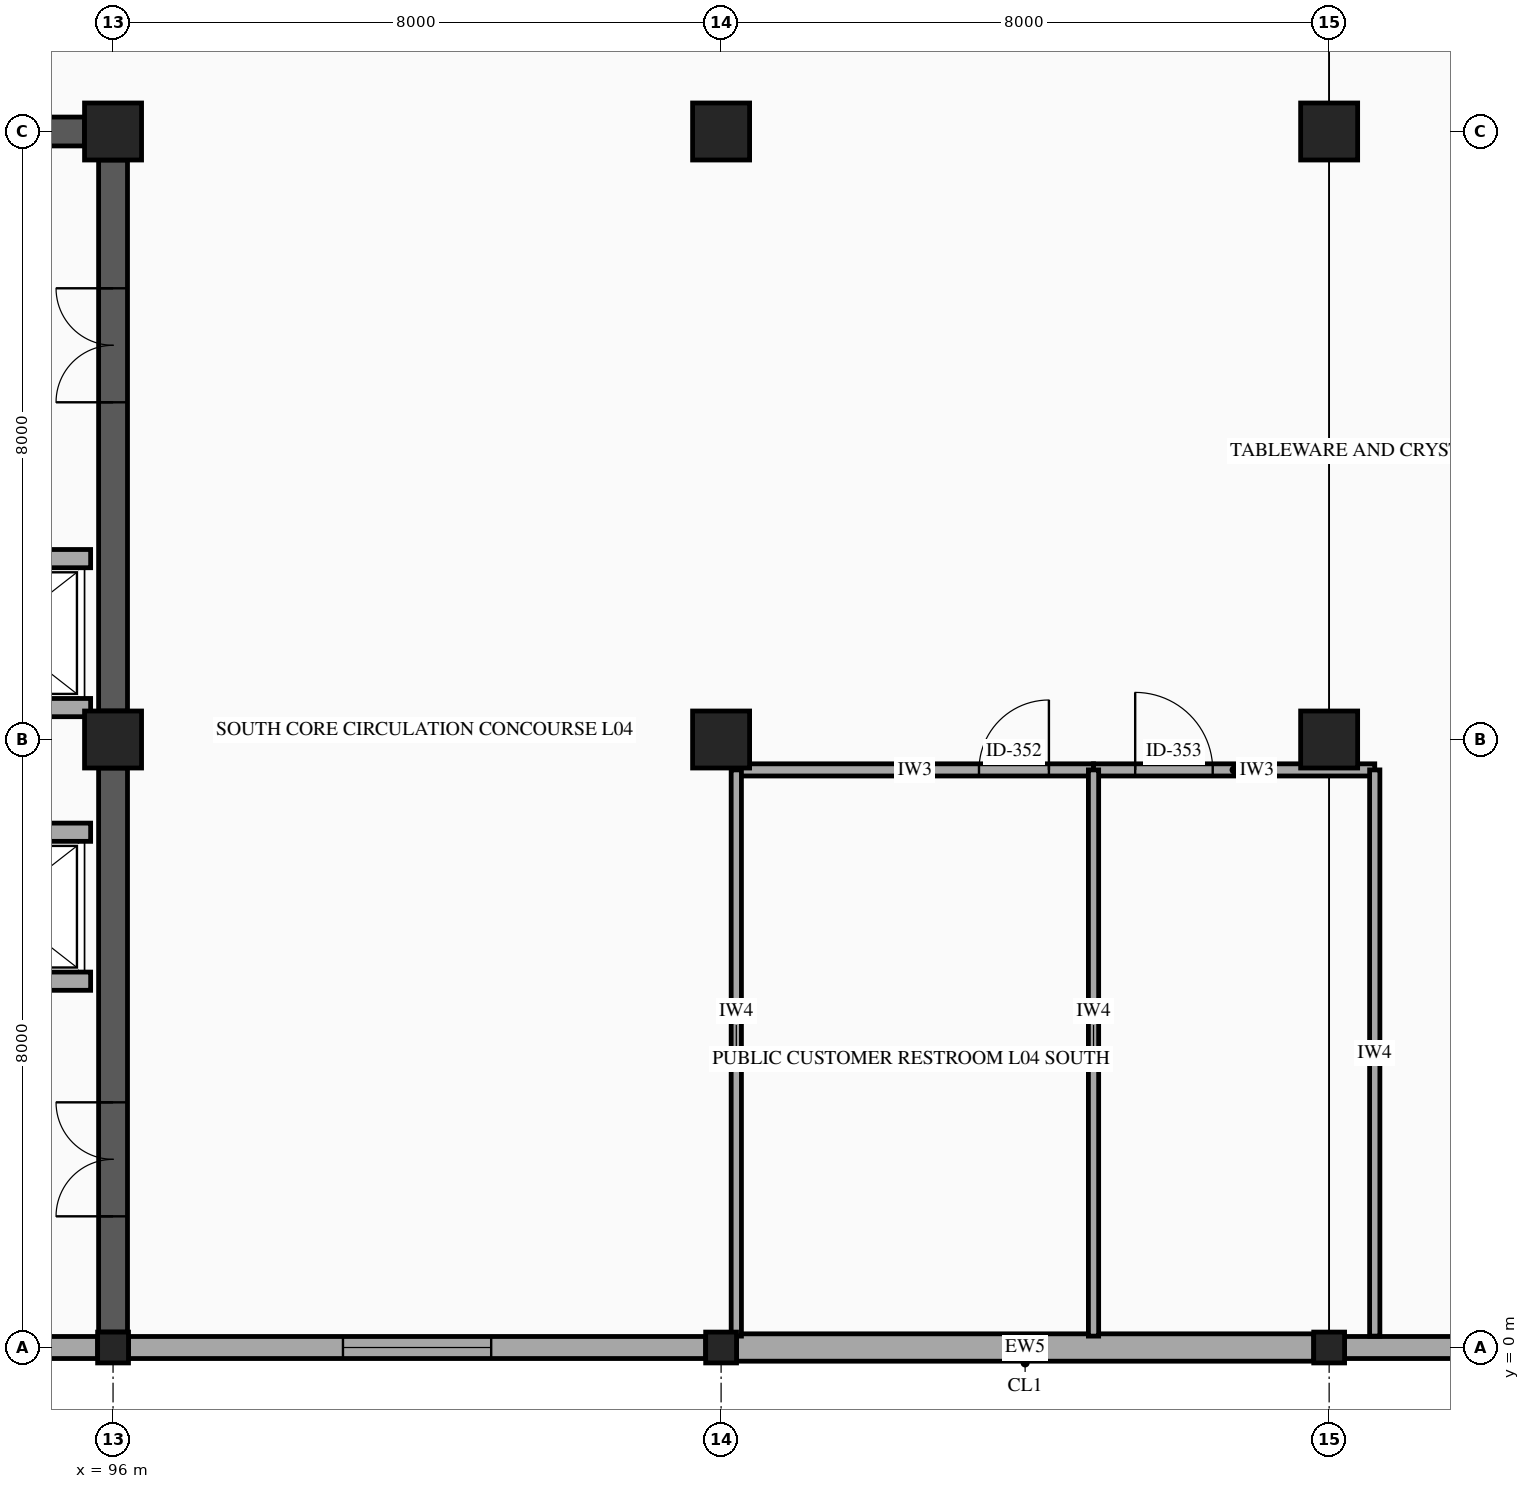
"""IFC4 building model, lengths in metres.
Left out: names, types, materials, properties, quantities, classifications, styles, units other than length and angle.
Written with IfcOpenShell. Run it as: python <this file> out.ifc"""

import sys

from ifc_helpers import new_model, si_unit, direction, frame, frame_2d, origin, origin_2d, place, context, subcontext, project, spatial, rectangle, hollow_rectangle, extrude, element, fill, save


model = new_model("IFC4")
c1 = context("Model", 3, precision=1e-05, world=origin(), true_north=direction((0.0, 1.0)))
c2 = subcontext(c1, "Body", "Model", "MODEL_VIEW")
j1 = project(units=[si_unit("LENGTHUNIT", "METRE"), si_unit("PLANEANGLEUNIT", "RADIAN")], contexts=[c1])
p1 = place(None, origin())
s1 = spatial("IfcSite", under=j1, at=p1, CompositionType="ELEMENT")
p2 = place(p1, origin())
s2 = spatial("IfcBuilding", under=s1, at=p2, CompositionType="ELEMENT")
p3 = place(p2, frame((0.0, 0.0, 19.4)))
s3 = spatial("IfcBuildingStorey", under=s2, at=p3, CompositionType="ELEMENT", Elevation=19.4)
p4 = place(p3, frame((96.0, 0.0, 0.0), z_axis=(0.0, 0.0, 1.0), x_axis=(1.0, 0.0, 0.0)))
e1 = element("IfcColumn", 1, at=p4, inside=s3, PredefinedType="COLUMN", context=c2, shape_type="SweptSolid", body=[
    extrude(hollow_rectangle(XDim=0.406, YDim=0.406, WallThickness=0.015, InnerFilletRadius=0.015, OuterFilletRadius=0.029, at=origin_2d()), origin(), (0.0, 0.0, 1.0), 4.5),
])
for number, where, z_axis, x_axis in (
    (2, (96.0, 8.0, 0.0), (0.0, 0.0, 1.0), (1.0, 0.0, 0.0)),
    (3, (96.0, 16.0, 0.0), (0.0, 0.0, 1.0), (1.0, 0.0, 0.0)),
):
    element("IfcColumn", number, at=place(p3, frame(where, z_axis=z_axis, x_axis=x_axis)), inside=s3, PredefinedType="COLUMN", context=c2, shape_type="SweptSolid", body=[
        extrude(rectangle(XDim=0.75, YDim=0.75, at=origin_2d()), origin(), (0.0, 0.0, 1.0), 4.5),
    ])
p5 = place(p3, frame((104.0, 0.0, 0.0), z_axis=(0.0, 0.0, 1.0), x_axis=(1.0, 0.0, 0.0)))
e4 = element("IfcColumn", 4, at=p5, inside=s3, PredefinedType="COLUMN", context=c2, shape_type="SweptSolid", body=[
    extrude(hollow_rectangle(XDim=0.406, YDim=0.406, WallThickness=0.015, InnerFilletRadius=0.015, OuterFilletRadius=0.029, at=origin_2d()), origin(), (0.0, 0.0, 1.0), 4.5),
])
for number, where, z_axis, x_axis in (
    (5, (104.0, 8.0, 0.0), (0.0, 0.0, 1.0), (1.0, 0.0, 0.0)),
    (6, (104.0, 16.0, 0.0), (0.0, 0.0, 1.0), (1.0, 0.0, 0.0)),
):
    element("IfcColumn", number, at=place(p3, frame(where, z_axis=z_axis, x_axis=x_axis)), inside=s3, PredefinedType="COLUMN", context=c2, shape_type="SweptSolid", body=[
        extrude(rectangle(XDim=0.75, YDim=0.75, at=origin_2d()), origin(), (0.0, 0.0, 1.0), 4.5),
    ])
p6 = place(p3, frame((112.0, 0.0, 0.0), z_axis=(0.0, 0.0, 1.0), x_axis=(1.0, 0.0, 0.0)))
e7 = element("IfcColumn", 7, at=p6, inside=s3, PredefinedType="COLUMN", context=c2, shape_type="SweptSolid", body=[
    extrude(hollow_rectangle(XDim=0.406, YDim=0.406, WallThickness=0.015, InnerFilletRadius=0.015, OuterFilletRadius=0.029, at=origin_2d()), origin(), (0.0, 0.0, 1.0), 4.5),
])
for number, where, z_axis, x_axis in (
    (8, (112.0, 8.0, 0.0), (0.0, 0.0, 1.0), (1.0, 0.0, 0.0)),
    (9, (112.0, 16.0, 0.0), (0.0, 0.0, 1.0), (1.0, 0.0, 0.0)),
):
    element("IfcColumn", number, at=place(p3, frame(where, z_axis=z_axis, x_axis=x_axis)), inside=s3, PredefinedType="COLUMN", context=c2, shape_type="SweptSolid", body=[
        extrude(rectangle(XDim=0.75, YDim=0.75, at=origin_2d()), origin(), (0.0, 0.0, 1.0), 4.5),
    ])
p7 = place(p3, frame((119.797, 0.0, 0.0), z_axis=(0.0, 0.0, 1.0), x_axis=(-1.0, 0.0, 0.0)))
e10 = element("IfcWall", 10, at=p7, inside=s3, PredefinedType="STANDARD", context=c2, shape_type="SweptSolid", body=[
    extrude(rectangle(XDim=7.594, YDim=0.29, at=frame_2d((3.797, 0.0))), origin(), (0.0, 0.0, 1.0), 3.48),
])
p8 = place(p7, frame((2.822, 0.0, 0.8)))
e11 = element("IfcOpeningElement", 11, at=p8, cuts=e10, PredefinedType="OPENING", context=c2, shape_type="SweptSolid", body=[
    extrude(rectangle(XDim=1.95, YDim=1.8, at=frame_2d((0.975, 0.9))), frame((0.0, 0.155, 0.0), z_axis=(0.0, -1.0, 0.0), x_axis=(1.0, 0.0, 0.0)), (0.0, 0.0, 1.0), 0.31),
])
p9 = place(p3, frame((111.797, 0.0, 0.0), z_axis=(0.0, 0.0, 1.0), x_axis=(-1.0, 0.0, 0.0)))
e12 = element("IfcWall", 12, at=p9, inside=s3, PredefinedType="SOLIDWALL", context=c2, shape_type="SweptSolid", body=[
    extrude(rectangle(XDim=7.594, YDim=0.36, at=frame_2d((3.797, 0.0))), origin(), (0.0, 0.0, 1.0), 3.48),
])
p10 = place(p3, frame((103.797, 0.0, 0.0), z_axis=(0.0, 0.0, 1.0), x_axis=(-1.0, 0.0, 0.0)))
e13 = element("IfcWall", 13, at=p10, inside=s3, PredefinedType="STANDARD", context=c2, shape_type="SweptSolid", body=[
    extrude(rectangle(XDim=7.594, YDim=0.29, at=frame_2d((3.797, 0.0))), origin(), (0.0, 0.0, 1.0), 3.48),
])
p11 = place(p10, frame((2.822, 0.0, 0.8)))
e14 = element("IfcOpeningElement", 14, at=p11, cuts=e13, PredefinedType="OPENING", context=c2, shape_type="SweptSolid", body=[
    extrude(rectangle(XDim=1.95, YDim=1.8, at=frame_2d((0.975, 0.9))), frame((0.0, 0.155, 0.0), z_axis=(0.0, -1.0, 0.0), x_axis=(1.0, 0.0, 0.0)), (0.0, 0.0, 1.0), 0.31),
])
p12 = place(p3, frame((95.797, 0.0, 0.0), z_axis=(0.0, 0.0, 1.0), x_axis=(-1.0, 0.0, 0.0)))
e15 = element("IfcWall", 15, at=p12, inside=s3, PredefinedType="STANDARD", context=c2, shape_type="SweptSolid", body=[
    extrude(rectangle(XDim=7.594, YDim=0.29, at=frame_2d((3.797, 0.0))), origin(), (0.0, 0.0, 1.0), 3.48),
])
p13 = place(p3, frame((88.375, 16.0, 0.0), z_axis=(0.0, 0.0, 1.0), x_axis=(1.0, 0.0, 0.0)))
e16 = element("IfcWall", 16, at=p13, inside=s3, PredefinedType="SHEAR", context=c2, shape_type="SweptSolid", body=[
    extrude(rectangle(XDim=7.25, YDim=0.38, at=frame_2d((3.625, 0.0))), origin(), (0.0, 0.0, 1.0), 4.28),
])
p14 = place(p13, frame((2.875, 0.0, 0.0)))
e17 = element("IfcOpeningElement", 17, at=p14, cuts=e16, PredefinedType="OPENING", context=c2, shape_type="SweptSolid", body=[
    extrude(rectangle(XDim=1.5, YDim=2.15, at=frame_2d((0.75, 1.075))), frame((0.0, 0.2, 0.0), z_axis=(0.0, -1.0, 0.0), x_axis=(1.0, 0.0, 0.0)), (0.0, 0.0, 1.0), 0.4),
])
p15 = place(p3, frame((96.0, 0.203, 0.0), z_axis=(0.0, 0.0, 1.0), x_axis=(0.0, 1.0, 0.0)))
e18 = element("IfcWall", 18, at=p15, inside=s3, PredefinedType="SHEAR", context=c2, shape_type="SweptSolid", body=[
    extrude(rectangle(XDim=7.422, YDim=0.38, at=frame_2d((3.711, 0.0))), origin(), (0.0, 0.0, 1.0), 4.28),
])
p16 = place(p15, frame((1.523, 0.0, 0.0)))
e19 = element("IfcOpeningElement", 19, at=p16, cuts=e18, PredefinedType="OPENING", context=c2, shape_type="SweptSolid", body=[
    extrude(rectangle(XDim=1.5, YDim=2.15, at=frame_2d((0.75, 1.075))), frame((0.0, 0.2, 0.0), z_axis=(0.0, -1.0, 0.0), x_axis=(1.0, 0.0, 0.0)), (0.0, 0.0, 1.0), 0.4),
])
p17 = place(p3, frame((96.0, 8.375, 0.0), z_axis=(0.0, 0.0, 1.0), x_axis=(0.0, 1.0, 0.0)))
e20 = element("IfcWall", 20, at=p17, inside=s3, PredefinedType="SHEAR", context=c2, shape_type="SweptSolid", body=[
    extrude(rectangle(XDim=7.25, YDim=0.38, at=frame_2d((3.625, 0.0))), origin(), (0.0, 0.0, 1.0), 4.28),
])
p18 = place(p17, frame((4.062, 0.0, 0.0)))
e21 = element("IfcOpeningElement", 21, at=p18, cuts=e20, PredefinedType="OPENING", context=c2, shape_type="SweptSolid", body=[
    extrude(rectangle(XDim=1.5, YDim=2.15, at=frame_2d((0.75, 1.075))), frame((0.0, 0.2, 0.0), z_axis=(0.0, -1.0, 0.0), x_axis=(1.0, 0.0, 0.0)), (0.0, 0.0, 1.0), 0.4),
])
p19 = place(p3, frame((93.295, 6.78, 0.0), z_axis=(0.0, 0.0, 1.0), x_axis=(1.0, 0.0, 0.0)))
e22 = element("IfcWall", 22, at=p19, inside=s3, PredefinedType="PARTITIONING", context=c2, shape_type="SweptSolid", body=[
    extrude(rectangle(XDim=2.41, YDim=0.24, at=frame_2d((1.205, 0.0))), origin(), (0.0, 0.0, 1.0), 4.28),
])
p20 = place(p19, frame((0.655, 0.0, 0.0)))
e23 = element("IfcOpeningElement", 23, at=p20, cuts=e22, PredefinedType="OPENING", context=c2, shape_type="SweptSolid", body=[
    extrude(rectangle(XDim=1.1, YDim=2.15, at=frame_2d((0.55, 1.075))), frame((0.0, 0.13, 0.0), z_axis=(0.0, -1.0, 0.0), x_axis=(1.0, 0.0, 0.0)), (0.0, 0.0, 1.0), 0.26),
])
p21 = place(p3, frame((93.295, 4.82, 0.0), z_axis=(0.0, 0.0, 1.0), x_axis=(1.0, 0.0, 0.0)))
e24 = element("IfcWall", 24, at=p21, inside=s3, PredefinedType="PARTITIONING", context=c2, shape_type="SweptSolid", body=[
    extrude(rectangle(XDim=2.41, YDim=0.24, at=frame_2d((1.205, 0.0))), origin(), (0.0, 0.0, 1.0), 4.28),
])
p22 = place(p3, frame((93.295, 10.38, 0.0), z_axis=(0.0, 0.0, 1.0), x_axis=(1.0, 0.0, 0.0)))
e25 = element("IfcWall", 25, at=p22, inside=s3, PredefinedType="PARTITIONING", context=c2, shape_type="SweptSolid", body=[
    extrude(rectangle(XDim=2.41, YDim=0.24, at=frame_2d((1.205, 0.0))), origin(), (0.0, 0.0, 1.0), 4.28),
])
p23 = place(p22, frame((0.655, 0.0, 0.0)))
e26 = element("IfcOpeningElement", 26, at=p23, cuts=e25, PredefinedType="OPENING", context=c2, shape_type="SweptSolid", body=[
    extrude(rectangle(XDim=1.1, YDim=2.15, at=frame_2d((0.55, 1.075))), frame((0.0, 0.13, 0.0), z_axis=(0.0, -1.0, 0.0), x_axis=(1.0, 0.0, 0.0)), (0.0, 0.0, 1.0), 0.26),
])
p24 = place(p3, frame((93.295, 8.42, 0.0), z_axis=(0.0, 0.0, 1.0), x_axis=(1.0, 0.0, 0.0)))
e27 = element("IfcWall", 27, at=p24, inside=s3, PredefinedType="PARTITIONING", context=c2, shape_type="SweptSolid", body=[
    extrude(rectangle(XDim=2.41, YDim=0.24, at=frame_2d((1.205, 0.0))), origin(), (0.0, 0.0, 1.0), 4.28),
])
p25 = place(p3, frame((104.2, 7.6, 0.0), z_axis=(0.0, 0.0, 1.0), x_axis=(1.0, 0.0, 0.0)))
e28 = element("IfcWall", 28, at=p25, inside=s3, PredefinedType="PARTITIONING", context=c2, shape_type="SweptSolid", body=[
    extrude(rectangle(XDim=4.7, YDim=0.16, at=frame_2d((2.35, 0.0))), origin(), (0.0, 0.0, 1.0), 3.48),
])
p26 = place(p25, frame((3.193, 0.0, 0.0)))
e29 = element("IfcOpeningElement", 29, at=p26, cuts=e28, PredefinedType="OPENING", context=c2, shape_type="SweptSolid", body=[
    extrude(rectangle(XDim=0.92, YDim=2.1, at=frame_2d((0.46, 1.05))), frame((0.0, 0.09, 0.0), z_axis=(0.0, -1.0, 0.0), x_axis=(1.0, 0.0, 0.0)), (0.0, 0.0, 1.0), 0.18),
])
p27 = place(p3, frame((108.9, 7.6, 0.0), z_axis=(0.0, 0.0, 1.0), x_axis=(1.0, 0.0, 0.0)))
e30 = element("IfcWall", 30, at=p27, inside=s3, PredefinedType="PARTITIONING", context=c2, shape_type="SweptSolid", body=[
    extrude(rectangle(XDim=3.7, YDim=0.16, at=frame_2d((1.85, 0.0))), origin(), (0.0, 0.0, 1.0), 3.48),
])
p28 = place(p27, frame((0.548, 0.0, 0.0)))
e31 = element("IfcOpeningElement", 31, at=p28, cuts=e30, PredefinedType="OPENING", context=c2, shape_type="SweptSolid", body=[
    extrude(rectangle(XDim=1.02, YDim=2.1, at=frame_2d((0.51, 1.05))), frame((0.0, 0.09, 0.0), z_axis=(0.0, -1.0, 0.0), x_axis=(1.0, 0.0, 0.0)), (0.0, 0.0, 1.0), 0.18),
])
for number, where, z_axis, x_axis in (
    (32, (104.2, 0.15, 0.0), (0.0, 0.0, 1.0), (0.0, 1.0, 0.0)),
    (33, (108.9, 0.15, 0.0), (0.0, 0.0, 1.0), (0.0, 1.0, 0.0)),
    (34, (112.6, 0.15, 0.0), (0.0, 0.0, 1.0), (0.0, 1.0, 0.0)),
):
    element("IfcWall", number, at=place(p3, frame(where, z_axis=z_axis, x_axis=x_axis)), inside=s3, PredefinedType="PARTITIONING", context=c2, shape_type="SweptSolid", body=[
        extrude(rectangle(XDim=7.45, YDim=0.135, at=frame_2d((3.725, 0.0))), origin(), (0.0, 0.0, 1.0), 3.48),
    ])
p29 = place(p11, origin())
e35 = element("IfcWindow", 35, at=p29, inside=s3, PartitioningType="DOUBLE_PANEL_VERTICAL", PredefinedType="WINDOW", context=c2, shape_type="SweptSolid", body=[
    extrude(rectangle(XDim=1.95, YDim=1.8, at=frame_2d((0.975, 0.9))), frame((0.0, 0.03, 0.0), z_axis=(0.0, -1.0, 0.0), x_axis=(1.0, 0.0, 0.0)), (0.0, 0.0, 1.0), 0.06),
])
fill(e14, e35)
p30 = place(p16, origin())
e36 = element("IfcDoor", 36, at=p30, inside=s3, OperationType="DOUBLE_DOOR_SINGLE_SWING", PredefinedType="DOOR", context=c2, shape_type="SweptSolid", body=[
    extrude(rectangle(XDim=1.5, YDim=2.15, at=frame_2d((0.75, 1.075))), frame((0.0, 0.025, 0.0), z_axis=(0.0, -1.0, 0.0), x_axis=(1.0, 0.0, 0.0)), (0.0, 0.0, 1.0), 0.05),
])
fill(e19, e36)
p31 = place(p18, origin())
e37 = element("IfcDoor", 37, at=p31, inside=s3, OperationType="DOUBLE_DOOR_SINGLE_SWING", PredefinedType="DOOR", context=c2, shape_type="SweptSolid", body=[
    extrude(rectangle(XDim=1.5, YDim=2.15, at=frame_2d((0.75, 1.075))), frame((0.0, 0.025, 0.0), z_axis=(0.0, -1.0, 0.0), x_axis=(1.0, 0.0, 0.0)), (0.0, 0.0, 1.0), 0.05),
])
fill(e21, e37)
p32 = place(p26, origin())
e38 = element("IfcDoor", 38, at=p32, inside=s3, OperationType="SINGLE_SWING_RIGHT", PredefinedType="DOOR", context=c2, shape_type="SweptSolid", body=[
    extrude(rectangle(XDim=0.92, YDim=2.1, at=frame_2d((0.46, 1.05))), frame((0.0, 0.025, 0.0), z_axis=(0.0, -1.0, 0.0), x_axis=(1.0, 0.0, 0.0)), (0.0, 0.0, 1.0), 0.05),
])
fill(e29, e38)
p33 = place(p28, origin())
e39 = element("IfcDoor", 39, at=p33, inside=s3, OperationType="SINGLE_SWING_LEFT", PredefinedType="DOOR", context=c2, shape_type="SweptSolid", body=[
    extrude(rectangle(XDim=1.02, YDim=2.1, at=frame_2d((0.51, 1.05))), frame((0.0, 0.025, 0.0), z_axis=(0.0, -1.0, 0.0), x_axis=(1.0, 0.0, 0.0)), (0.0, 0.0, 1.0), 0.05),
])
fill(e31, e39)
save(model, sys.argv[1])
